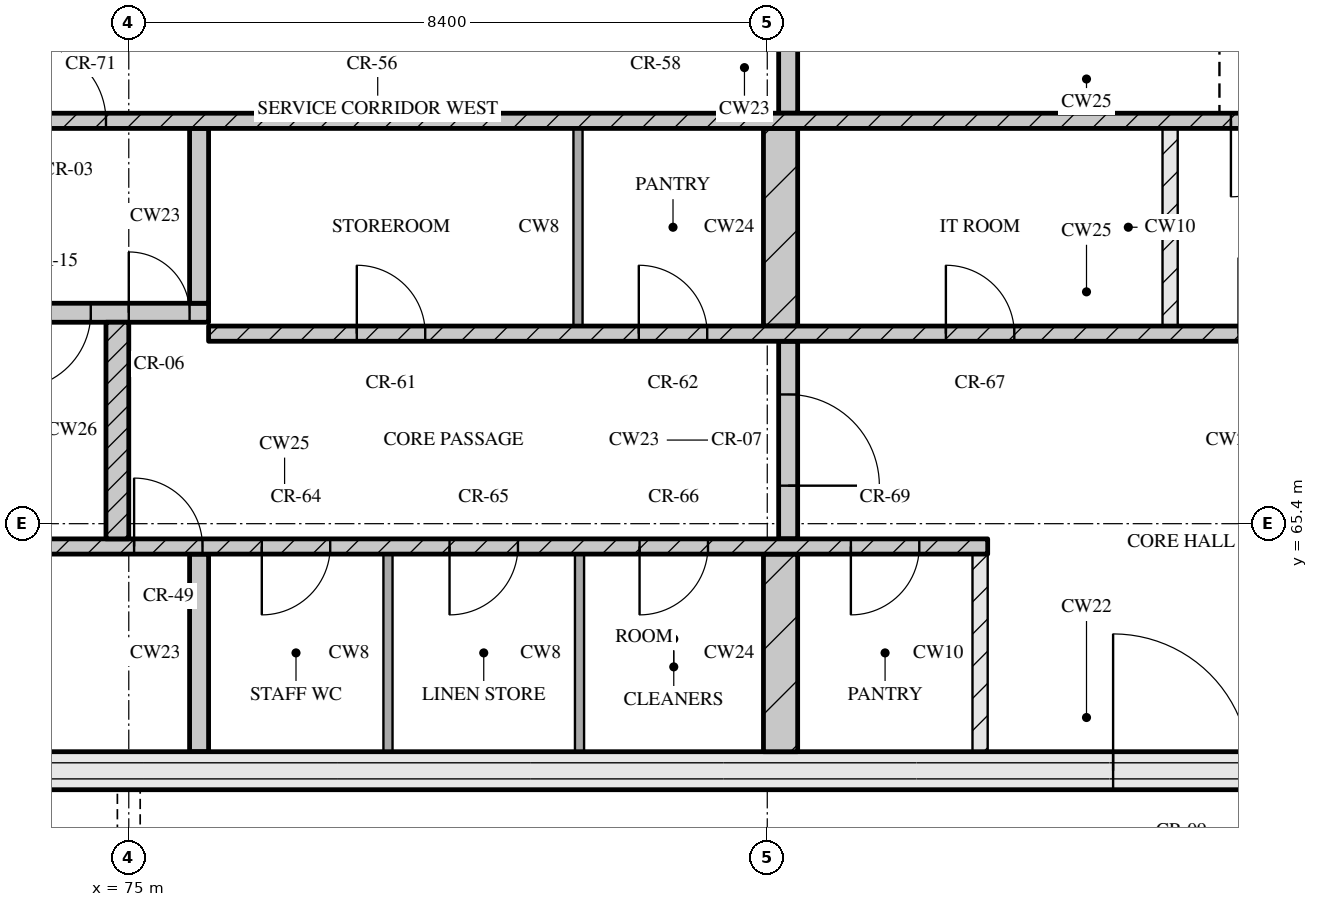
"""IFC4 building model, lengths in metres.
Left out: names, types, materials, properties, quantities, classifications, styles, units other than length and angle.
Written with IfcOpenShell. Run it as: python <this file> out.ifc"""

import sys

from ifc_helpers import new_model, si_unit, direction, frame, frame_2d, origin, place, context, subcontext, project, spatial, rectangle, extrude, element, fill, save


model = new_model("IFC4")
c1 = context("Model", 3, precision=1e-05, world=origin(), true_north=direction((0.0, 1.0)))
c2 = subcontext(c1, "Body", "Model", "MODEL_VIEW")
j1 = project(units=[si_unit("LENGTHUNIT", "METRE"), si_unit("PLANEANGLEUNIT", "RADIAN")], contexts=[c1])
p1 = place(None, origin())
s1 = spatial("IfcSite", under=j1, at=p1, CompositionType="ELEMENT")
p2 = place(p1, origin())
s2 = spatial("IfcBuilding", under=s1, at=p2, CompositionType="ELEMENT")
p3 = place(p2, frame((0.0, 0.0, 310.35)))
s3 = spatial("IfcBuildingStorey", under=s2, at=p3, CompositionType="ELEMENT", Elevation=310.35)
p4 = place(p3, frame((67.3, 62.15, 0.0), z_axis=(0.0, 0.0, 1.0), x_axis=(1.0, 0.0, 0.0)))
e1 = element("IfcWall", 1, at=p4, inside=s3, PredefinedType="SOLIDWALL", context=c2, shape_type="SweptSolid", body=[
    extrude(rectangle(XDim=40.6, YDim=0.5, at=frame_2d((20.3, 0.0))), origin(), (0.0, 0.0, 1.0), 4.2),
])
p5 = place(p4, frame((20.65, 0.0, 0.0)))
e2 = element("IfcOpeningElement", 2, at=p5, cuts=e1, PredefinedType="OPENING", context=c2, shape_type="SweptSolid", body=[
    extrude(rectangle(XDim=1.8, YDim=2.1, at=frame_2d((0.9, 1.05))), frame((0.0, 0.26, 0.0), z_axis=(0.0, -1.0, 0.0), x_axis=(1.0, 0.0, 0.0)), (0.0, 0.0, 1.0), 0.52),
])
p6 = place(p3, frame((75.925, 62.4, 0.0), z_axis=(0.0, 0.0, 1.0), x_axis=(0.0, 1.0, 0.0)))
e3 = element("IfcWall", 3, at=p6, inside=s3, PredefinedType="SOLIDWALL", context=c2, shape_type="SweptSolid", body=[
    extrude(rectangle(XDim=2.6, YDim=0.25, at=frame_2d((1.3, 0.0))), origin(), (0.0, 0.0, 1.0), 4.2),
])
for number, where, z_axis, x_axis in (
    (4, (78.41, 62.4, 0.0), (0.0, 0.0, 1.0), (0.0, 1.0, 0.0)),
    (5, (80.93, 62.4, 0.0), (0.0, 0.0, 1.0), (0.0, 1.0, 0.0)),
):
    element("IfcWall", number, at=place(p3, frame(where, z_axis=z_axis, x_axis=x_axis)), inside=s3, PredefinedType="PARTITIONING", context=c2, shape_type="SweptSolid", body=[
        extrude(rectangle(XDim=2.6, YDim=0.12, at=frame_2d((1.3, 0.0))), origin(), (0.0, 0.0, 1.0), 4.2),
    ])
p7 = place(p3, frame((83.575, 62.4, 0.0), z_axis=(0.0, 0.0, 1.0), x_axis=(0.0, 1.0, 0.0)))
e6 = element("IfcWall", 6, at=p7, inside=s3, PredefinedType="SOLIDWALL", context=c2, shape_type="SweptSolid", body=[
    extrude(rectangle(XDim=2.6, YDim=0.45, at=frame_2d((1.3, 0.0))), origin(), (0.0, 0.0, 1.0), 4.2),
])
p8 = place(p3, frame((86.2, 62.4, 0.0), z_axis=(0.0, 0.0, 1.0), x_axis=(0.0, 1.0, 0.0)))
e7 = element("IfcWall", 7, at=p8, inside=s3, PredefinedType="PARTITIONING", context=c2, shape_type="SweptSolid", body=[
    extrude(rectangle(XDim=2.6, YDim=0.2, at=frame_2d((1.3, 0.0))), origin(), (0.0, 0.0, 1.0), 4.2),
])
p9 = place(p3, frame((67.8, 65.1, 0.0), z_axis=(0.0, 0.0, 1.0), x_axis=(1.0, 0.0, 0.0)))
e8 = element("IfcWall", 8, at=p9, inside=s3, PredefinedType="SOLIDWALL", context=c2, shape_type="SweptSolid", body=[
    extrude(rectangle(XDim=18.5, YDim=0.2, at=frame_2d((9.25, 0.0))), origin(), (0.0, 0.0, 1.0), 4.2),
])
p10 = place(p9, frame((7.27, 0.0, 0.0)))
e9 = element("IfcOpeningElement", 9, at=p10, cuts=e8, PredefinedType="OPENING", context=c2, shape_type="SweptSolid", body=[
    extrude(rectangle(XDim=0.9, YDim=2.1, at=frame_2d((0.45, 1.05))), frame((0.0, 0.11, 0.0), z_axis=(0.0, -1.0, 0.0), x_axis=(1.0, 0.0, 0.0)), (0.0, 0.0, 1.0), 0.22),
])
p11 = place(p9, frame((8.95, 0.0, 0.0)))
e10 = element("IfcOpeningElement", 10, at=p11, cuts=e8, PredefinedType="OPENING", context=c2, shape_type="SweptSolid", body=[
    extrude(rectangle(XDim=0.9, YDim=2.1, at=frame_2d((0.45, 1.05))), frame((0.0, 0.11, 0.0), z_axis=(0.0, -1.0, 0.0), x_axis=(1.0, 0.0, 0.0)), (0.0, 0.0, 1.0), 0.22),
])
p12 = place(p9, frame((11.42, 0.0, 0.0)))
e11 = element("IfcOpeningElement", 11, at=p12, cuts=e8, PredefinedType="OPENING", context=c2, shape_type="SweptSolid", body=[
    extrude(rectangle(XDim=0.9, YDim=2.1, at=frame_2d((0.45, 1.05))), frame((0.0, 0.11, 0.0), z_axis=(0.0, -1.0, 0.0), x_axis=(1.0, 0.0, 0.0)), (0.0, 0.0, 1.0), 0.22),
])
p13 = place(p9, frame((13.92, 0.0, 0.0)))
e12 = element("IfcOpeningElement", 12, at=p13, cuts=e8, PredefinedType="OPENING", context=c2, shape_type="SweptSolid", body=[
    extrude(rectangle(XDim=0.9, YDim=2.1, at=frame_2d((0.45, 1.05))), frame((0.0, 0.11, 0.0), z_axis=(0.0, -1.0, 0.0), x_axis=(1.0, 0.0, 0.0)), (0.0, 0.0, 1.0), 0.22),
])
p14 = place(p9, frame((16.7, 0.0, 0.0)))
e13 = element("IfcOpeningElement", 13, at=p14, cuts=e8, PredefinedType="OPENING", context=c2, shape_type="SweptSolid", body=[
    extrude(rectangle(XDim=0.9, YDim=2.1, at=frame_2d((0.45, 1.05))), frame((0.0, 0.11, 0.0), z_axis=(0.0, -1.0, 0.0), x_axis=(1.0, 0.0, 0.0)), (0.0, 0.0, 1.0), 0.22),
])
p15 = place(p3, frame((74.85, 65.2, 0.0), z_axis=(0.0, 0.0, 1.0), x_axis=(0.0, 1.0, 0.0)))
e14 = element("IfcWall", 14, at=p15, inside=s3, PredefinedType="SOLIDWALL", context=c2, shape_type="SweptSolid", body=[
    extrude(rectangle(XDim=2.85, YDim=0.3, at=frame_2d((1.425, 0.0))), origin(), (0.0, 0.0, 1.0), 4.2),
])
p16 = place(p3, frame((83.675, 65.2, 0.0), z_axis=(0.0, 0.0, 1.0), x_axis=(0.0, 1.0, 0.0)))
e15 = element("IfcWall", 15, at=p16, inside=s3, PredefinedType="SOLIDWALL", context=c2, shape_type="SweptSolid", body=[
    extrude(rectangle(XDim=2.6, YDim=0.25, at=frame_2d((1.3, 0.0))), origin(), (0.0, 0.0, 1.0), 4.2),
])
p17 = place(p16, frame((0.7, 0.0, 0.0)))
e16 = element("IfcOpeningElement", 16, at=p17, cuts=e15, PredefinedType="OPENING", context=c2, shape_type="SweptSolid", body=[
    extrude(rectangle(XDim=1.2, YDim=2.1, at=frame_2d((0.6, 1.05))), frame((0.0, 0.135, 0.0), z_axis=(0.0, -1.0, 0.0), x_axis=(1.0, 0.0, 0.0)), (0.0, 0.0, 1.0), 0.27),
])
p18 = place(p3, frame((76.05, 67.9, 0.0), z_axis=(0.0, 0.0, 1.0), x_axis=(1.0, 0.0, 0.0)))
e17 = element("IfcWall", 17, at=p18, inside=s3, PredefinedType="SOLIDWALL", context=c2, shape_type="SweptSolid", body=[
    extrude(rectangle(XDim=23.1, YDim=0.2, at=frame_2d((11.55, 0.0))), origin(), (0.0, 0.0, 1.0), 4.2),
])
p19 = place(p18, frame((1.95, 0.0, 0.0)))
e18 = element("IfcOpeningElement", 18, at=p19, cuts=e17, PredefinedType="OPENING", context=c2, shape_type="SweptSolid", body=[
    extrude(rectangle(XDim=0.9, YDim=2.1, at=frame_2d((0.45, 1.05))), frame((0.0, 0.11, 0.0), z_axis=(0.0, -1.0, 0.0), x_axis=(1.0, 0.0, 0.0)), (0.0, 0.0, 1.0), 0.22),
])
p20 = place(p18, frame((5.66, 0.0, 0.0)))
e19 = element("IfcOpeningElement", 19, at=p20, cuts=e17, PredefinedType="OPENING", context=c2, shape_type="SweptSolid", body=[
    extrude(rectangle(XDim=0.9, YDim=2.1, at=frame_2d((0.45, 1.05))), frame((0.0, 0.11, 0.0), z_axis=(0.0, -1.0, 0.0), x_axis=(1.0, 0.0, 0.0)), (0.0, 0.0, 1.0), 0.22),
])
p21 = place(p18, frame((9.7, 0.0, 0.0)))
e20 = element("IfcOpeningElement", 20, at=p21, cuts=e17, PredefinedType="OPENING", context=c2, shape_type="SweptSolid", body=[
    extrude(rectangle(XDim=0.9, YDim=2.1, at=frame_2d((0.45, 1.05))), frame((0.0, 0.11, 0.0), z_axis=(0.0, -1.0, 0.0), x_axis=(1.0, 0.0, 0.0)), (0.0, 0.0, 1.0), 0.22),
])
p22 = place(p18, frame((13.55, 0.0, 0.0)))
e21 = element("IfcOpeningElement", 21, at=p22, cuts=e17, PredefinedType="OPENING", context=c2, shape_type="SweptSolid", body=[
    extrude(rectangle(XDim=1.0, YDim=2.1, at=frame_2d((0.5, 1.05))), frame((0.0, 0.11, 0.0), z_axis=(0.0, -1.0, 0.0), x_axis=(1.0, 0.0, 0.0)), (0.0, 0.0, 1.0), 0.22),
])
p23 = place(p3, frame((80.91, 68.0, 0.0), z_axis=(0.0, 0.0, 1.0), x_axis=(0.0, 1.0, 0.0)))
e22 = element("IfcWall", 22, at=p23, inside=s3, PredefinedType="PARTITIONING", context=c2, shape_type="SweptSolid", body=[
    extrude(rectangle(XDim=2.6, YDim=0.12, at=frame_2d((1.3, 0.0))), origin(), (0.0, 0.0, 1.0), 4.2),
])
p24 = place(p3, frame((83.575, 68.0, 0.0), z_axis=(0.0, 0.0, 1.0), x_axis=(0.0, 1.0, 0.0)))
e23 = element("IfcWall", 23, at=p24, inside=s3, PredefinedType="SOLIDWALL", context=c2, shape_type="SweptSolid", body=[
    extrude(rectangle(XDim=2.6, YDim=0.45, at=frame_2d((1.3, 0.0))), origin(), (0.0, 0.0, 1.0), 4.2),
])
p25 = place(p3, frame((88.7, 68.0, 0.0), z_axis=(0.0, 0.0, 1.0), x_axis=(0.0, 1.0, 0.0)))
e24 = element("IfcWall", 24, at=p25, inside=s3, PredefinedType="PARTITIONING", context=c2, shape_type="SweptSolid", body=[
    extrude(rectangle(XDim=2.6, YDim=0.2, at=frame_2d((1.3, 0.0))), origin(), (0.0, 0.0, 1.0), 4.2),
])
p26 = place(p3, frame((67.8, 68.175, 0.0), z_axis=(0.0, 0.0, 1.0), x_axis=(1.0, 0.0, 0.0)))
e25 = element("IfcWall", 25, at=p26, inside=s3, PredefinedType="SOLIDWALL", context=c2, shape_type="SweptSolid", body=[
    extrude(rectangle(XDim=8.25, YDim=0.25, at=frame_2d((4.125, 0.0))), origin(), (0.0, 0.0, 1.0), 4.2),
])
p27 = place(p26, frame((5.7, 0.0, 0.0)))
e26 = element("IfcOpeningElement", 26, at=p27, cuts=e25, PredefinedType="OPENING", context=c2, shape_type="SweptSolid", body=[
    extrude(rectangle(XDim=1.0, YDim=2.1, at=frame_2d((0.5, 1.05))), frame((0.0, 0.135, 0.0), z_axis=(0.0, -1.0, 0.0), x_axis=(1.0, 0.0, 0.0)), (0.0, 0.0, 1.0), 0.27),
])
p28 = place(p26, frame((7.2, 0.0, 0.0)))
e27 = element("IfcOpeningElement", 27, at=p28, cuts=e25, PredefinedType="OPENING", context=c2, shape_type="SweptSolid", body=[
    extrude(rectangle(XDim=0.8, YDim=2.1, at=frame_2d((0.4, 1.05))), frame((0.0, 0.135, 0.0), z_axis=(0.0, -1.0, 0.0), x_axis=(1.0, 0.0, 0.0)), (0.0, 0.0, 1.0), 0.27),
])
p29 = place(p3, frame((75.925, 68.3, 0.0), z_axis=(0.0, 0.0, 1.0), x_axis=(0.0, 1.0, 0.0)))
e28 = element("IfcWall", 28, at=p29, inside=s3, PredefinedType="SOLIDWALL", context=c2, shape_type="SweptSolid", body=[
    extrude(rectangle(XDim=2.3, YDim=0.25, at=frame_2d((1.15, 0.0))), origin(), (0.0, 0.0, 1.0), 4.2),
])
p30 = place(p3, frame((67.8, 70.7, 0.0), z_axis=(0.0, 0.0, 1.0), x_axis=(1.0, 0.0, 0.0)))
e29 = element("IfcWall", 29, at=p30, inside=s3, PredefinedType="SOLIDWALL", context=c2, shape_type="SweptSolid", body=[
    extrude(rectangle(XDim=39.6, YDim=0.2, at=frame_2d((19.8, 0.0))), origin(), (0.0, 0.0, 1.0), 4.2),
])
p31 = place(p30, frame((0.65, 0.0, 0.0)))
e30 = element("IfcOpeningElement", 30, at=p31, cuts=e29, PredefinedType="OPENING", context=c2, shape_type="SweptSolid", body=[
    extrude(rectangle(XDim=1.1, YDim=2.1, at=frame_2d((0.55, 1.05))), frame((0.0, 0.11, 0.0), z_axis=(0.0, -1.0, 0.0), x_axis=(1.0, 0.0, 0.0)), (0.0, 0.0, 1.0), 0.22),
])
p32 = place(p30, frame((3.25, 0.0, 0.0)))
e31 = element("IfcOpeningElement", 31, at=p32, cuts=e29, PredefinedType="OPENING", context=c2, shape_type="SweptSolid", body=[
    extrude(rectangle(XDim=1.1, YDim=2.1, at=frame_2d((0.55, 1.05))), frame((0.0, 0.11, 0.0), z_axis=(0.0, -1.0, 0.0), x_axis=(1.0, 0.0, 0.0)), (0.0, 0.0, 1.0), 0.22),
])
p33 = place(p30, frame((5.9, 0.0, 0.0)))
e32 = element("IfcOpeningElement", 32, at=p33, cuts=e29, PredefinedType="OPENING", context=c2, shape_type="SweptSolid", body=[
    extrude(rectangle(XDim=1.0, YDim=2.1, at=frame_2d((0.5, 1.05))), frame((0.0, 0.11, 0.0), z_axis=(0.0, -1.0, 0.0), x_axis=(1.0, 0.0, 0.0)), (0.0, 0.0, 1.0), 0.22),
])
p34 = place(p30, frame((21.7, 0.0, 0.0)))
e33 = element("IfcOpeningElement", 33, at=p34, cuts=e29, PredefinedType="OPENING", context=c2, shape_type="SweptSolid", body=[
    extrude(rectangle(XDim=1.0, YDim=2.1, at=frame_2d((0.5, 1.05))), frame((0.0, 0.11, 0.0), z_axis=(0.0, -1.0, 0.0), x_axis=(1.0, 0.0, 0.0)), (0.0, 0.0, 1.0), 0.22),
])
p35 = place(p30, frame((32.7, 0.0, 0.0)))
e34 = element("IfcOpeningElement", 34, at=p35, cuts=e29, PredefinedType="OPENING", context=c2, shape_type="SweptSolid", body=[
    extrude(rectangle(XDim=1.0, YDim=2.1, at=frame_2d((0.5, 1.05))), frame((0.0, 0.11, 0.0), z_axis=(0.0, -1.0, 0.0), x_axis=(1.0, 0.0, 0.0)), (0.0, 0.0, 1.0), 0.22),
])
p36 = place(p30, frame((35.25, 0.0, 0.0)))
e35 = element("IfcOpeningElement", 35, at=p36, cuts=e29, PredefinedType="OPENING", context=c2, shape_type="SweptSolid", body=[
    extrude(rectangle(XDim=1.1, YDim=2.1, at=frame_2d((0.55, 1.05))), frame((0.0, 0.11, 0.0), z_axis=(0.0, -1.0, 0.0), x_axis=(1.0, 0.0, 0.0)), (0.0, 0.0, 1.0), 0.22),
])
p37 = place(p30, frame((37.85, 0.0, 0.0)))
e36 = element("IfcOpeningElement", 36, at=p37, cuts=e29, PredefinedType="OPENING", context=c2, shape_type="SweptSolid", body=[
    extrude(rectangle(XDim=1.1, YDim=2.1, at=frame_2d((0.55, 1.05))), frame((0.0, 0.11, 0.0), z_axis=(0.0, -1.0, 0.0), x_axis=(1.0, 0.0, 0.0)), (0.0, 0.0, 1.0), 0.22),
])
p38 = place(p3, frame((83.675, 70.8, 0.0), z_axis=(0.0, 0.0, 1.0), x_axis=(0.0, 1.0, 0.0)))
e37 = element("IfcWall", 37, at=p38, inside=s3, PredefinedType="SOLIDWALL", context=c2, shape_type="SweptSolid", body=[
    extrude(rectangle(XDim=1.2, YDim=0.25, at=frame_2d((0.6, 0.0))), origin(), (0.0, 0.0, 1.0), 4.2),
])
p39 = place(p5, origin())
e38 = element("IfcDoor", 38, at=p39, inside=s3, OperationType="DOUBLE_DOOR_SINGLE_SWING", PredefinedType="DOOR", context=c2, shape_type="SweptSolid", body=[
    extrude(rectangle(XDim=1.8, YDim=2.1, at=frame_2d((0.9, 1.05))), frame((0.0, 0.025, 0.0), z_axis=(0.0, -1.0, 0.0), x_axis=(1.0, 0.0, 0.0)), (0.0, 0.0, 1.0), 0.05),
])
fill(e2, e38)
p40 = place(p10, origin())
e39 = element("IfcDoor", 39, at=p40, inside=s3, OperationType="SINGLE_SWING_LEFT", PredefinedType="DOOR", context=c2, shape_type="SweptSolid", body=[
    extrude(rectangle(XDim=0.9, YDim=2.1, at=frame_2d((0.45, 1.05))), frame((0.0, 0.025, 0.0), z_axis=(0.0, -1.0, 0.0), x_axis=(1.0, 0.0, 0.0)), (0.0, 0.0, 1.0), 0.05),
])
fill(e9, e39)
p41 = place(p11, origin())
e40 = element("IfcDoor", 40, at=p41, inside=s3, OperationType="SINGLE_SWING_RIGHT", PredefinedType="DOOR", context=c2, shape_type="SweptSolid", body=[
    extrude(rectangle(XDim=0.9, YDim=2.1, at=frame_2d((0.45, 1.05))), frame((0.0, 0.025, 0.0), z_axis=(0.0, -1.0, 0.0), x_axis=(1.0, 0.0, 0.0)), (0.0, 0.0, 1.0), 0.05),
])
fill(e10, e40)
p42 = place(p12, origin())
e41 = element("IfcDoor", 41, at=p42, inside=s3, OperationType="SINGLE_SWING_RIGHT", PredefinedType="DOOR", context=c2, shape_type="SweptSolid", body=[
    extrude(rectangle(XDim=0.9, YDim=2.1, at=frame_2d((0.45, 1.05))), frame((0.0, 0.025, 0.0), z_axis=(0.0, -1.0, 0.0), x_axis=(1.0, 0.0, 0.0)), (0.0, 0.0, 1.0), 0.05),
])
fill(e11, e41)
p43 = place(p13, origin())
e42 = element("IfcDoor", 42, at=p43, inside=s3, OperationType="SINGLE_SWING_RIGHT", PredefinedType="DOOR", context=c2, shape_type="SweptSolid", body=[
    extrude(rectangle(XDim=0.9, YDim=2.1, at=frame_2d((0.45, 1.05))), frame((0.0, 0.025, 0.0), z_axis=(0.0, -1.0, 0.0), x_axis=(1.0, 0.0, 0.0)), (0.0, 0.0, 1.0), 0.05),
])
fill(e12, e42)
p44 = place(p14, origin())
e43 = element("IfcDoor", 43, at=p44, inside=s3, OperationType="SINGLE_SWING_RIGHT", PredefinedType="DOOR", context=c2, shape_type="SweptSolid", body=[
    extrude(rectangle(XDim=0.9, YDim=2.1, at=frame_2d((0.45, 1.05))), frame((0.0, 0.025, 0.0), z_axis=(0.0, -1.0, 0.0), x_axis=(1.0, 0.0, 0.0)), (0.0, 0.0, 1.0), 0.05),
])
fill(e13, e43)
p45 = place(p17, origin())
e44 = element("IfcDoor", 44, at=p45, inside=s3, OperationType="SINGLE_SWING_RIGHT", PredefinedType="DOOR", context=c2, shape_type="SweptSolid", body=[
    extrude(rectangle(XDim=1.2, YDim=2.1, at=frame_2d((0.6, 1.05))), frame((0.0, 0.025, 0.0), z_axis=(0.0, -1.0, 0.0), x_axis=(1.0, 0.0, 0.0)), (0.0, 0.0, 1.0), 0.05),
])
fill(e16, e44)
p46 = place(p19, origin())
e45 = element("IfcDoor", 45, at=p46, inside=s3, OperationType="SINGLE_SWING_LEFT", PredefinedType="DOOR", context=c2, shape_type="SweptSolid", body=[
    extrude(rectangle(XDim=0.9, YDim=2.1, at=frame_2d((0.45, 1.05))), frame((0.0, 0.025, 0.0), z_axis=(0.0, -1.0, 0.0), x_axis=(1.0, 0.0, 0.0)), (0.0, 0.0, 1.0), 0.05),
])
fill(e18, e45)
p47 = place(p20, origin())
e46 = element("IfcDoor", 46, at=p47, inside=s3, OperationType="SINGLE_SWING_LEFT", PredefinedType="DOOR", context=c2, shape_type="SweptSolid", body=[
    extrude(rectangle(XDim=0.9, YDim=2.1, at=frame_2d((0.45, 1.05))), frame((0.0, 0.025, 0.0), z_axis=(0.0, -1.0, 0.0), x_axis=(1.0, 0.0, 0.0)), (0.0, 0.0, 1.0), 0.05),
])
fill(e19, e46)
p48 = place(p21, origin())
e47 = element("IfcDoor", 47, at=p48, inside=s3, OperationType="SINGLE_SWING_LEFT", PredefinedType="DOOR", context=c2, shape_type="SweptSolid", body=[
    extrude(rectangle(XDim=0.9, YDim=2.1, at=frame_2d((0.45, 1.05))), frame((0.0, 0.025, 0.0), z_axis=(0.0, -1.0, 0.0), x_axis=(1.0, 0.0, 0.0)), (0.0, 0.0, 1.0), 0.05),
])
fill(e20, e47)
p49 = place(p27, origin())
e48 = element("IfcDoor", 48, at=p49, inside=s3, OperationType="SINGLE_SWING_RIGHT", PredefinedType="DOOR", context=c2, shape_type="SweptSolid", body=[
    extrude(rectangle(XDim=1.0, YDim=2.1, at=frame_2d((0.5, 1.05))), frame((0.0, 0.025, 0.0), z_axis=(0.0, -1.0, 0.0), x_axis=(1.0, 0.0, 0.0)), (0.0, 0.0, 1.0), 0.05),
])
fill(e26, e48)
p50 = place(p28, origin())
e49 = element("IfcDoor", 49, at=p50, inside=s3, OperationType="SINGLE_SWING_LEFT", PredefinedType="DOOR", context=c2, shape_type="SweptSolid", body=[
    extrude(rectangle(XDim=0.8, YDim=2.1, at=frame_2d((0.4, 1.05))), frame((0.0, 0.025, 0.0), z_axis=(0.0, -1.0, 0.0), x_axis=(1.0, 0.0, 0.0)), (0.0, 0.0, 1.0), 0.05),
])
fill(e27, e49)
p51 = place(p33, origin())
e50 = element("IfcDoor", 50, at=p51, inside=s3, OperationType="SINGLE_SWING_LEFT", PredefinedType="DOOR", context=c2, shape_type="SweptSolid", body=[
    extrude(rectangle(XDim=1.0, YDim=2.1, at=frame_2d((0.5, 1.05))), frame((0.0, 0.025, 0.0), z_axis=(0.0, -1.0, 0.0), x_axis=(1.0, 0.0, 0.0)), (0.0, 0.0, 1.0), 0.05),
])
fill(e32, e50)
p52 = place(p34, origin())
e51 = element("IfcDoor", 51, at=p52, inside=s3, OperationType="SINGLE_SWING_RIGHT", PredefinedType="DOOR", context=c2, shape_type="SweptSolid", body=[
    extrude(rectangle(XDim=1.0, YDim=2.1, at=frame_2d((0.5, 1.05))), frame((0.0, 0.025, 0.0), z_axis=(0.0, -1.0, 0.0), x_axis=(1.0, 0.0, 0.0)), (0.0, 0.0, 1.0), 0.05),
])
fill(e33, e51)
save(model, sys.argv[1])
